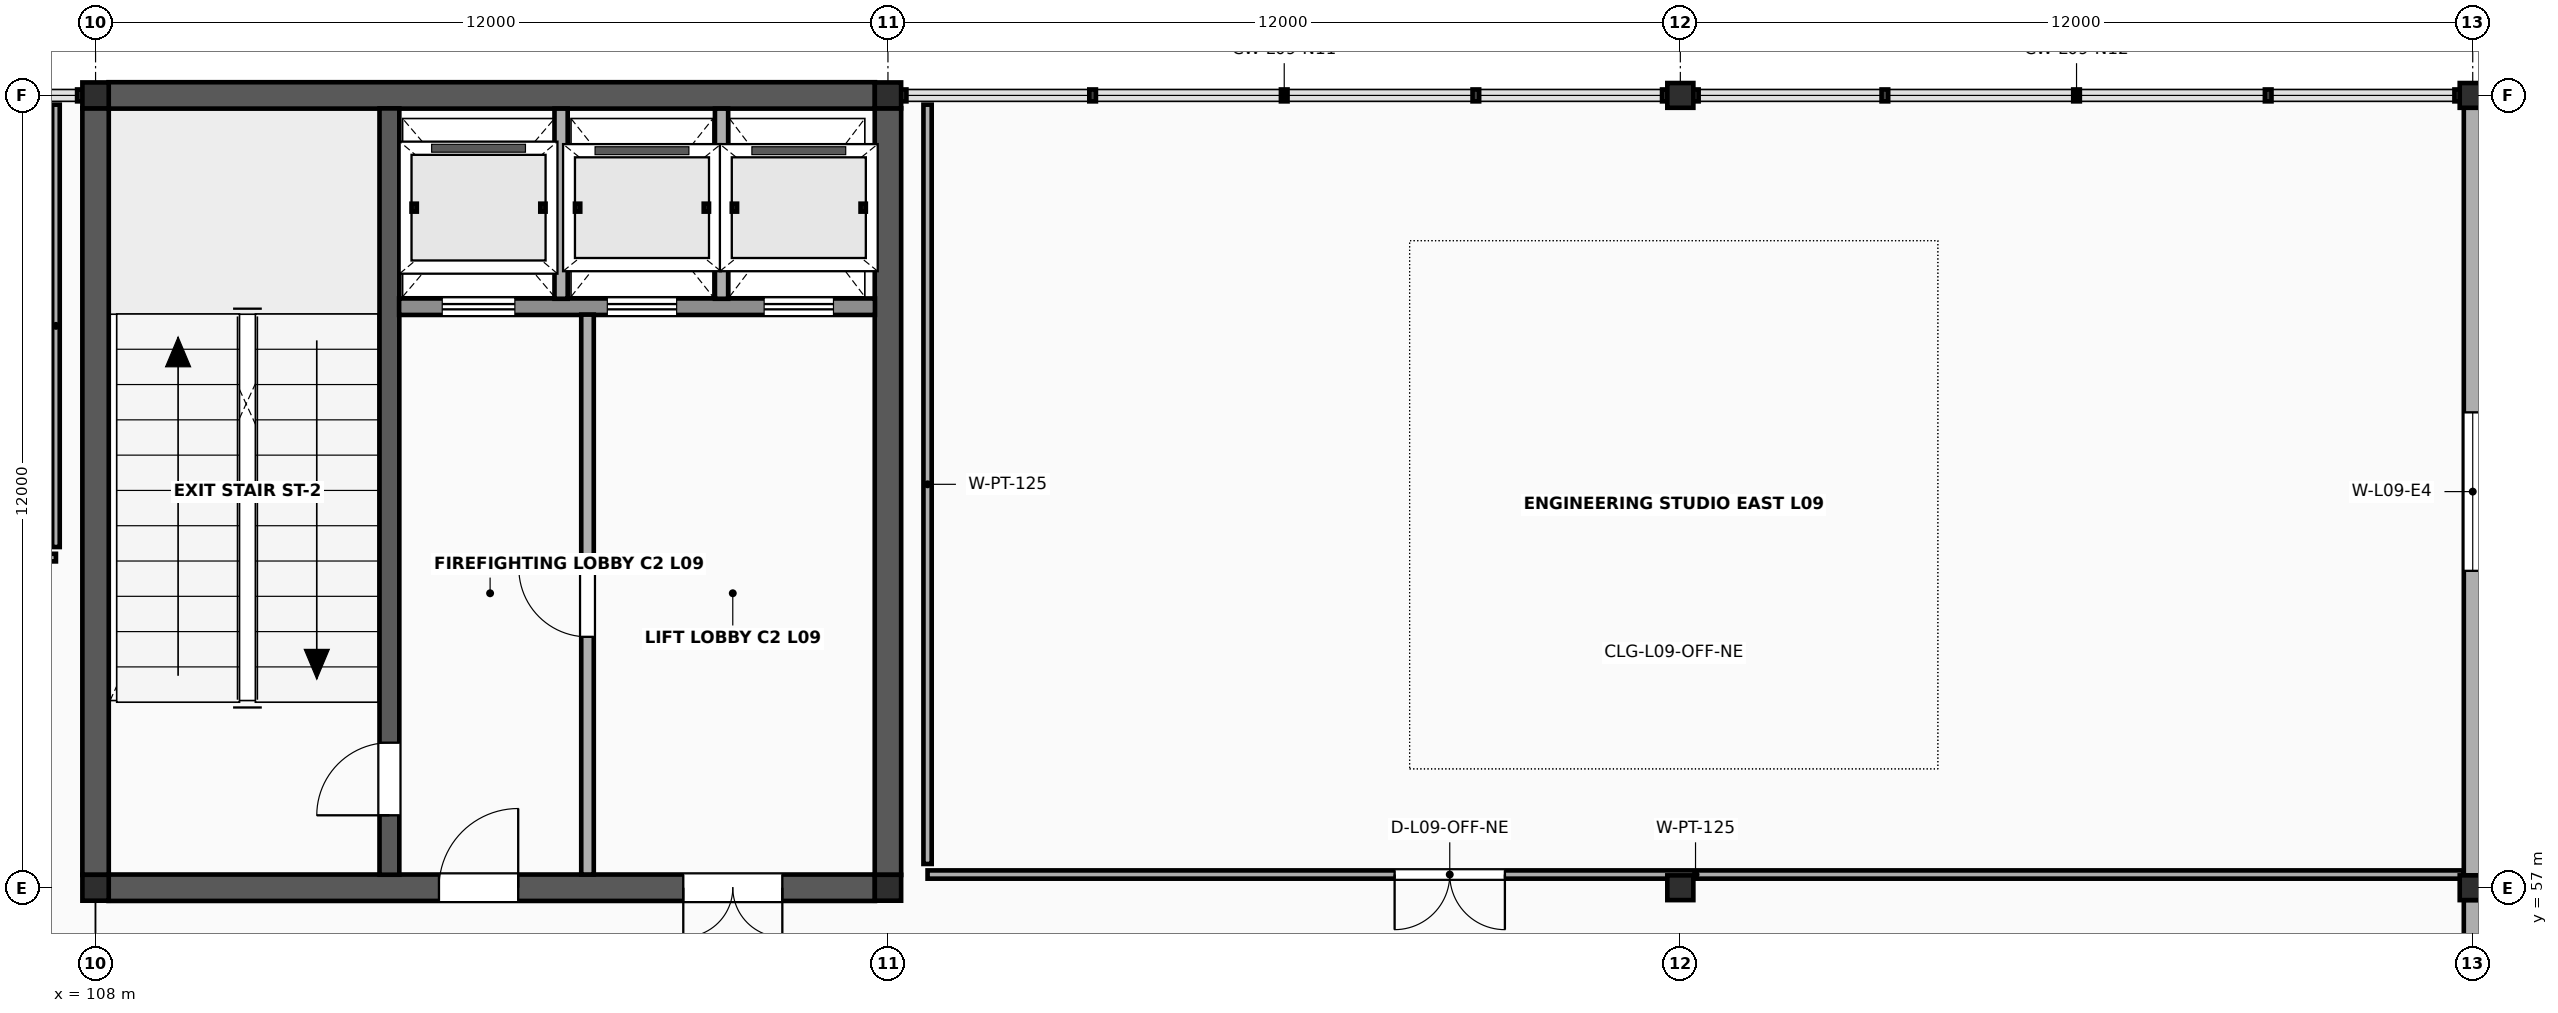
"""IFC4 building model, lengths in metres.
Left out: names, types, materials, properties, quantities, classifications, styles, units other than length and angle.
Written with IfcOpenShell. Run it as: python <this file> out.ifc"""

import sys

from ifc_helpers import new_model, si_unit, direction, frame, frame_2d, origin, origin_2d, place, context, subcontext, project, spatial, rectangle, i_section, extrude, element, fill, save


model = new_model("IFC4")
c1 = context("Model", 3, precision=1e-05, world=origin(), true_north=direction((0.0, 1.0)))
c2 = subcontext(c1, "Body", "Model", "MODEL_VIEW")
j1 = project(units=[si_unit("LENGTHUNIT", "METRE"), si_unit("PLANEANGLEUNIT", "RADIAN")], contexts=[c1])
p1 = place(None, origin())
s1 = spatial("IfcSite", under=j1, at=p1, CompositionType="ELEMENT")
p2 = place(p1, origin())
s2 = spatial("IfcBuilding", under=s1, at=p2, CompositionType="ELEMENT")
p3 = place(p2, frame((0.0, 0.0, 37.6)))
s3 = spatial("IfcBuildingStorey", under=s2, at=p3, CompositionType="ELEMENT", Elevation=37.6)
for number, where, z_axis, x_axis in (
    (1, (108.0, 57.0, 0.0), (0.0, 0.0, 1.0), (1.0, 0.0, 0.0)),
    (2, (108.0, 69.0, 0.0), (0.0, 0.0, 1.0), (1.0, 0.0, 0.0)),
    (3, (120.0, 57.0, 0.0), (0.0, 0.0, 1.0), (1.0, 0.0, 0.0)),
    (4, (120.0, 69.0, 0.0), (0.0, 0.0, 1.0), (1.0, 0.0, 0.0)),
):
    element("IfcColumn", number, at=place(p3, frame(where, z_axis=z_axis, x_axis=x_axis)), inside=s3, PredefinedType="COLUMN", context=c2, shape_type="SweptSolid", body=[
        extrude(i_section(OverallWidth=0.399, OverallDepth=0.393, WebThickness=0.023, FlangeThickness=0.037, FilletRadius=0.018, at=origin_2d()), origin(), (0.0, 0.0, 1.0), 4.0),
    ])
for number, where, z_axis, x_axis in (
    (5, (132.0, 57.0, 0.0), (0.0, 0.0, 1.0), (1.0, 0.0, 0.0)),
    (6, (132.0, 69.0, 0.0), (0.0, 0.0, 1.0), (1.0, 0.0, 0.0)),
    (7, (144.0, 57.0, 0.0), (0.0, 0.0, 1.0), (1.0, 0.0, 0.0)),
    (8, (144.0, 69.0, 0.0), (0.0, 0.0, 1.0), (1.0, 0.0, 0.0)),
):
    element("IfcColumn", number, at=place(p3, frame(where, z_axis=z_axis, x_axis=x_axis)), inside=s3, PredefinedType="COLUMN", context=c2, shape_type="SweptSolid", body=[
        extrude(i_section(OverallWidth=0.394, OverallDepth=0.375, WebThickness=0.017, FlangeThickness=0.028, FilletRadius=0.018, at=origin_2d()), origin(), (0.0, 0.0, 1.0), 4.0),
    ])
p4 = place(p3, frame((108.197, 57.0, 0.0), z_axis=(0.0, 0.0, 1.0), x_axis=(1.0, 0.0, 0.0)))
e9 = element("IfcWall", 9, at=p4, inside=s3, PredefinedType="SHEAR", context=c2, shape_type="SweptSolid", body=[
    extrude(rectangle(XDim=11.607, YDim=0.4, at=frame_2d((5.803, 0.0))), origin(), (0.0, 0.0, 1.0), 3.838),
])
p5 = place(p4, frame((5.004, 0.0, 0.0)))
e10 = element("IfcOpeningElement", 10, at=p5, cuts=e9, PredefinedType="OPENING", context=c2, shape_type="SweptSolid", body=[
    extrude(rectangle(XDim=1.2, YDim=2.2, at=frame_2d((0.6, 1.1))), frame((0.0, 0.215, 0.0), z_axis=(0.0, -1.0, 0.0), x_axis=(1.0, 0.0, 0.0)), (0.0, 0.0, 1.0), 0.43),
])
p6 = place(p4, frame((8.704, 0.0, 0.0)))
e11 = element("IfcOpeningElement", 11, at=p6, cuts=e9, PredefinedType="OPENING", context=c2, shape_type="SweptSolid", body=[
    extrude(rectangle(XDim=1.5, YDim=2.25, at=frame_2d((0.75, 1.125))), frame((0.0, 0.215, 0.0), z_axis=(0.0, -1.0, 0.0), x_axis=(1.0, 0.0, 0.0)), (0.0, 0.0, 1.0), 0.43),
])
p7 = place(p3, frame((108.197, 69.0, 0.0), z_axis=(0.0, 0.0, 1.0), x_axis=(1.0, 0.0, 0.0)))
e12 = element("IfcWall", 12, at=p7, inside=s3, PredefinedType="SHEAR", context=c2, shape_type="SweptSolid", body=[
    extrude(rectangle(XDim=11.607, YDim=0.4, at=frame_2d((5.803, 0.0))), origin(), (0.0, 0.0, 1.0), 3.838),
])
for number, where, z_axis, x_axis in (
    (13, (108.0, 57.194, 0.0), (0.0, 0.0, 1.0), (0.0, 1.0, 0.0)),
    (14, (120.0, 57.194, 0.0), (0.0, 0.0, 1.0), (0.0, 1.0, 0.0)),
):
    element("IfcWall", number, at=place(p3, frame(where, z_axis=z_axis, x_axis=x_axis)), inside=s3, PredefinedType="SHEAR", context=c2, shape_type="SweptSolid", body=[
        extrude(rectangle(XDim=11.613, YDim=0.4, at=frame_2d((5.806, 0.0))), origin(), (0.0, 0.0, 1.0), 3.838),
    ])
p8 = place(p3, frame((112.45, 57.197, 0.0), z_axis=(0.0, 0.0, 1.0), x_axis=(0.0, 1.0, 0.0)))
e15 = element("IfcWall", 15, at=p8, inside=s3, PredefinedType="SHEAR", context=c2, shape_type="SweptSolid", body=[
    extrude(rectangle(XDim=11.606, YDim=0.3, at=frame_2d((5.803, 0.0))), origin(), (0.0, 0.0, 1.0), 3.838),
])
p9 = place(p8, frame((0.9, 0.0, 0.0)))
e16 = element("IfcOpeningElement", 16, at=p9, cuts=e15, PredefinedType="OPENING", context=c2, shape_type="SweptSolid", body=[
    extrude(rectangle(XDim=1.1, YDim=2.2, at=frame_2d((0.55, 1.1))), frame((0.0, 0.165, 0.0), z_axis=(0.0, -1.0, 0.0), x_axis=(1.0, 0.0, 0.0)), (0.0, 0.0, 1.0), 0.33),
])
p10 = place(p3, frame((112.597, 65.8, 0.0), z_axis=(0.0, 0.0, 1.0), x_axis=(1.0, 0.0, 0.0)))
e17 = element("IfcWall", 17, at=p10, inside=s3, PredefinedType="SOLIDWALL", context=c2, shape_type="SweptSolid", body=[
    extrude(rectangle(XDim=7.206, YDim=0.25, at=frame_2d((3.603, 0.0))), origin(), (0.0, 0.0, 1.0), 3.838),
])
p11 = place(p10, frame((0.653, 0.0, 0.0)))
e18 = element("IfcOpeningElement", 18, at=p11, cuts=e17, PredefinedType="OPENING", context=c2, shape_type="SweptSolid", body=[
    extrude(rectangle(XDim=1.1, YDim=2.24, at=frame_2d((0.55, 1.12))), frame((0.0, 0.14, 0.0), z_axis=(0.0, -1.0, 0.0), x_axis=(1.0, 0.0, 0.0)), (0.0, 0.0, 1.0), 0.28),
])
p12 = place(p10, frame((3.153, 0.0, 0.0)))
e19 = element("IfcOpeningElement", 19, at=p12, cuts=e17, PredefinedType="OPENING", context=c2, shape_type="SweptSolid", body=[
    extrude(rectangle(XDim=1.05, YDim=2.2, at=frame_2d((0.525, 1.1))), frame((0.0, 0.14, 0.0), z_axis=(0.0, -1.0, 0.0), x_axis=(1.0, 0.0, 0.0)), (0.0, 0.0, 1.0), 0.28),
])
p13 = place(p10, frame((5.528, 0.0, 0.0)))
e20 = element("IfcOpeningElement", 20, at=p13, cuts=e17, PredefinedType="OPENING", context=c2, shape_type="SweptSolid", body=[
    extrude(rectangle(XDim=1.05, YDim=2.2, at=frame_2d((0.525, 1.1))), frame((0.0, 0.14, 0.0), z_axis=(0.0, -1.0, 0.0), x_axis=(1.0, 0.0, 0.0)), (0.0, 0.0, 1.0), 0.28),
])
for number, where, z_axis, x_axis in (
    (21, (115.05, 65.92, 0.0), (0.0, 0.0, 1.0), (0.0, 1.0, 0.0)),
    (22, (117.48, 65.92, 0.0), (0.0, 0.0, 1.0), (0.0, 1.0, 0.0)),
):
    element("IfcWall", number, at=place(p3, frame(where, z_axis=z_axis, x_axis=x_axis)), inside=s3, PredefinedType="SOLIDWALL", context=c2, shape_type="SweptSolid", body=[
        extrude(rectangle(XDim=2.88, YDim=0.2, at=frame_2d((1.44, 0.0))), origin(), (0.0, 0.0, 1.0), 3.828),
    ])
p14 = place(p3, frame((115.45, 57.2, 0.0), z_axis=(0.0, 0.0, 1.0), x_axis=(0.0, 1.0, 0.0)))
e23 = element("IfcWall", 23, at=p14, inside=s3, PredefinedType="SOLIDWALL", context=c2, shape_type="SweptSolid", body=[
    extrude(rectangle(XDim=8.48, YDim=0.19, at=frame_2d((4.24, 0.0))), origin(), (0.0, 0.0, 1.0), 3.828),
])
p15 = place(p14, frame((3.6, 0.0, 0.0)))
e24 = element("IfcOpeningElement", 24, at=p15, cuts=e23, PredefinedType="OPENING", context=c2, shape_type="SweptSolid", body=[
    extrude(rectangle(XDim=1.04, YDim=2.18, at=frame_2d((0.52, 1.09))), frame((0.0, 0.11, 0.0), z_axis=(0.0, -1.0, 0.0), x_axis=(1.0, 0.0, 0.0)), (0.0, 0.0, 1.0), 0.22),
])
p16 = place(p3, frame((144.0, 45.186, 0.0), z_axis=(0.0, 0.0, 1.0), x_axis=(0.0, 1.0, 0.0)))
e25 = element("IfcWall", 25, at=p16, inside=s3, PredefinedType="SOLIDWALL", context=c2, shape_type="SweptSolid", body=[
    extrude(rectangle(XDim=11.629, YDim=0.27, at=frame_2d((5.814, 0.0))), origin(), (0.0, 0.0, 1.0), 3.291),
])
p17 = place(p16, frame((4.704, 0.0, 0.78)))
e26 = element("IfcOpeningElement", 26, at=p17, cuts=e25, PredefinedType="OPENING", context=c2, shape_type="SweptSolid", body=[
    extrude(rectangle(XDim=2.22, YDim=1.74, at=frame_2d((1.11, 0.87))), frame((0.0, 0.15, 0.0), z_axis=(0.0, -1.0, 0.0), x_axis=(1.0, 0.0, 0.0)), (0.0, 0.0, 1.0), 0.3),
])
p18 = place(p3, frame((144.0, 57.186, 0.0), z_axis=(0.0, 0.0, 1.0), x_axis=(0.0, 1.0, 0.0)))
e27 = element("IfcWall", 27, at=p18, inside=s3, PredefinedType="SOLIDWALL", context=c2, shape_type="SweptSolid", body=[
    extrude(rectangle(XDim=11.629, YDim=0.27, at=frame_2d((5.814, 0.0))), origin(), (0.0, 0.0, 1.0), 3.291),
])
p19 = place(p18, frame((4.614, 0.0, 0.78)))
e28 = element("IfcOpeningElement", 28, at=p19, cuts=e27, PredefinedType="OPENING", context=c2, shape_type="SweptSolid", body=[
    extrude(rectangle(XDim=2.4, YDim=1.74, at=frame_2d((1.2, 0.87))), frame((0.0, 0.15, 0.0), z_axis=(0.0, -1.0, 0.0), x_axis=(1.0, 0.0, 0.0)), (0.0, 0.0, 1.0), 0.3),
])
p20 = place(p3, frame((84.6, 62.0, 0.0), z_axis=(0.0, 0.0, 1.0), x_axis=(1.0, 0.0, 0.0)))
e29 = element("IfcWall", 29, at=p20, inside=s3, PredefinedType="PARTITIONING", context=c2, shape_type="SweptSolid", body=[
    extrude(rectangle(XDim=22.8, YDim=0.115, at=frame_2d((11.4, 0.0))), origin(), (0.0, 0.0, 1.0), 2.88),
])
p21 = place(p20, frame((10.94, 0.0, 0.0)))
e30 = element("IfcOpeningElement", 30, at=p21, cuts=e29, PredefinedType="OPENING", context=c2, shape_type="SweptSolid", body=[
    extrude(rectangle(XDim=0.92, YDim=2.1, at=frame_2d((0.46, 1.05))), frame((0.0, 0.073, 0.0), z_axis=(0.0, -1.0, 0.0), x_axis=(1.0, 0.0, 0.0)), (0.0, 0.0, 1.0), 0.145),
])
p22 = place(p3, frame((107.4, 62.16, 0.0), z_axis=(0.0, 0.0, 1.0), x_axis=(0.0, 1.0, 0.0)))
e31 = element("IfcWall", 31, at=p22, inside=s3, PredefinedType="PARTITIONING", context=c2, shape_type="SweptSolid", body=[
    extrude(rectangle(XDim=6.7, YDim=0.115, at=frame_2d((3.35, 0.0))), origin(), (0.0, 0.0, 1.0), 2.88),
])
p23 = place(p3, frame((120.6, 57.2, 0.0), z_axis=(0.0, 0.0, 1.0), x_axis=(1.0, 0.0, 0.0)))
e32 = element("IfcWall", 32, at=p23, inside=s3, PredefinedType="PARTITIONING", context=c2, shape_type="SweptSolid", body=[
    extrude(rectangle(XDim=23.26, YDim=0.125, at=frame_2d((11.63, 0.0))), origin(), (0.0, 0.0, 1.0), 2.88),
])
p24 = place(p23, frame((7.073, 0.0, 0.0)))
e33 = element("IfcOpeningElement", 33, at=p24, cuts=e32, PredefinedType="OPENING", context=c2, shape_type="SweptSolid", body=[
    extrude(rectangle(XDim=1.67, YDim=2.35, at=frame_2d((0.835, 1.175))), frame((0.0, 0.077, 0.0), z_axis=(0.0, -1.0, 0.0), x_axis=(1.0, 0.0, 0.0)), (0.0, 0.0, 1.0), 0.155),
])
p25 = place(p3, frame((120.6, 57.36, 0.0), z_axis=(0.0, 0.0, 1.0), x_axis=(0.0, 1.0, 0.0)))
e34 = element("IfcWall", 34, at=p25, inside=s3, PredefinedType="PARTITIONING", context=c2, shape_type="SweptSolid", body=[
    extrude(rectangle(XDim=11.5, YDim=0.125, at=frame_2d((5.75, 0.0))), origin(), (0.0, 0.0, 1.0), 2.88),
])
p26 = place(p19, origin())
e35 = element("IfcWindow", 35, at=p26, inside=s3, PartitioningType="DOUBLE_PANEL_VERTICAL", PredefinedType="WINDOW", context=c2, shape_type="SweptSolid", body=[
    extrude(rectangle(XDim=2.4, YDim=1.74, at=frame_2d((1.2, 0.87))), frame((0.0, 0.03, 0.0), z_axis=(0.0, -1.0, 0.0), x_axis=(1.0, 0.0, 0.0)), (0.0, 0.0, 1.0), 0.06),
])
fill(e28, e35)
p27 = place(p9, origin())
e36 = element("IfcDoor", 36, at=p27, inside=s3, OperationType="SINGLE_SWING_LEFT", PredefinedType="DOOR", context=c2, shape_type="SweptSolid", body=[
    extrude(rectangle(XDim=1.1, YDim=2.2, at=frame_2d((0.55, 1.1))), frame((0.0, 0.025, 0.0), z_axis=(0.0, -1.0, 0.0), x_axis=(1.0, 0.0, 0.0)), (0.0, 0.0, 1.0), 0.05),
])
fill(e16, e36)
p28 = place(p15, origin())
e37 = element("IfcDoor", 37, at=p28, inside=s3, OperationType="SINGLE_SWING_RIGHT", PredefinedType="DOOR", context=c2, shape_type="SweptSolid", body=[
    extrude(rectangle(XDim=1.04, YDim=2.18, at=frame_2d((0.52, 1.09))), frame((0.0, 0.025, 0.0), z_axis=(0.0, -1.0, 0.0), x_axis=(1.0, 0.0, 0.0)), (0.0, 0.0, 1.0), 0.05),
])
fill(e24, e37)
p29 = place(p5, origin())
e38 = element("IfcDoor", 38, at=p29, inside=s3, OperationType="SINGLE_SWING_RIGHT", PredefinedType="DOOR", context=c2, shape_type="SweptSolid", body=[
    extrude(rectangle(XDim=1.2, YDim=2.2, at=frame_2d((0.6, 1.1))), frame((0.0, 0.025, 0.0), z_axis=(0.0, -1.0, 0.0), x_axis=(1.0, 0.0, 0.0)), (0.0, 0.0, 1.0), 0.05),
])
fill(e10, e38)
p30 = place(p6, origin())
e39 = element("IfcDoor", 39, at=p30, inside=s3, OperationType="DOUBLE_DOOR_SINGLE_SWING", PredefinedType="DOOR", context=c2, shape_type="SweptSolid", body=[
    extrude(rectangle(XDim=1.5, YDim=2.25, at=frame_2d((0.75, 1.125))), frame((0.0, 0.025, 0.0), z_axis=(0.0, -1.0, 0.0), x_axis=(1.0, 0.0, 0.0)), (0.0, 0.0, 1.0), 0.05),
])
fill(e11, e39)
p31 = place(p11, origin())
e40 = element("IfcDoor", 40, at=p31, inside=s3, OperationType="SLIDING_TO_LEFT", PredefinedType="USERDEFINED", context=c2, shape_type="SweptSolid", body=[
    extrude(rectangle(XDim=1.1, YDim=2.24, at=frame_2d((0.55, 1.12))), frame((0.0, 0.025, 0.0), z_axis=(0.0, -1.0, 0.0), x_axis=(1.0, 0.0, 0.0)), (0.0, 0.0, 1.0), 0.05),
])
fill(e18, e40)
p32 = place(p12, origin())
e41 = element("IfcDoor", 41, at=p32, inside=s3, OperationType="SLIDING_TO_LEFT", PredefinedType="USERDEFINED", context=c2, shape_type="SweptSolid", body=[
    extrude(rectangle(XDim=1.05, YDim=2.2, at=frame_2d((0.525, 1.1))), frame((0.0, 0.025, 0.0), z_axis=(0.0, -1.0, 0.0), x_axis=(1.0, 0.0, 0.0)), (0.0, 0.0, 1.0), 0.05),
])
fill(e19, e41)
p33 = place(p13, origin())
e42 = element("IfcDoor", 42, at=p33, inside=s3, OperationType="SLIDING_TO_LEFT", PredefinedType="USERDEFINED", context=c2, shape_type="SweptSolid", body=[
    extrude(rectangle(XDim=1.05, YDim=2.2, at=frame_2d((0.525, 1.1))), frame((0.0, 0.025, 0.0), z_axis=(0.0, -1.0, 0.0), x_axis=(1.0, 0.0, 0.0)), (0.0, 0.0, 1.0), 0.05),
])
fill(e20, e42)
p34 = place(p24, origin())
e43 = element("IfcDoor", 43, at=p34, inside=s3, OperationType="DOUBLE_DOOR_SINGLE_SWING", PredefinedType="DOOR", context=c2, shape_type="SweptSolid", body=[
    extrude(rectangle(XDim=1.67, YDim=2.35, at=frame_2d((0.835, 1.175))), frame((0.0, 0.025, 0.0), z_axis=(0.0, -1.0, 0.0), x_axis=(1.0, 0.0, 0.0)), (0.0, 0.0, 1.0), 0.05),
])
fill(e33, e43)
save(model, sys.argv[1])
